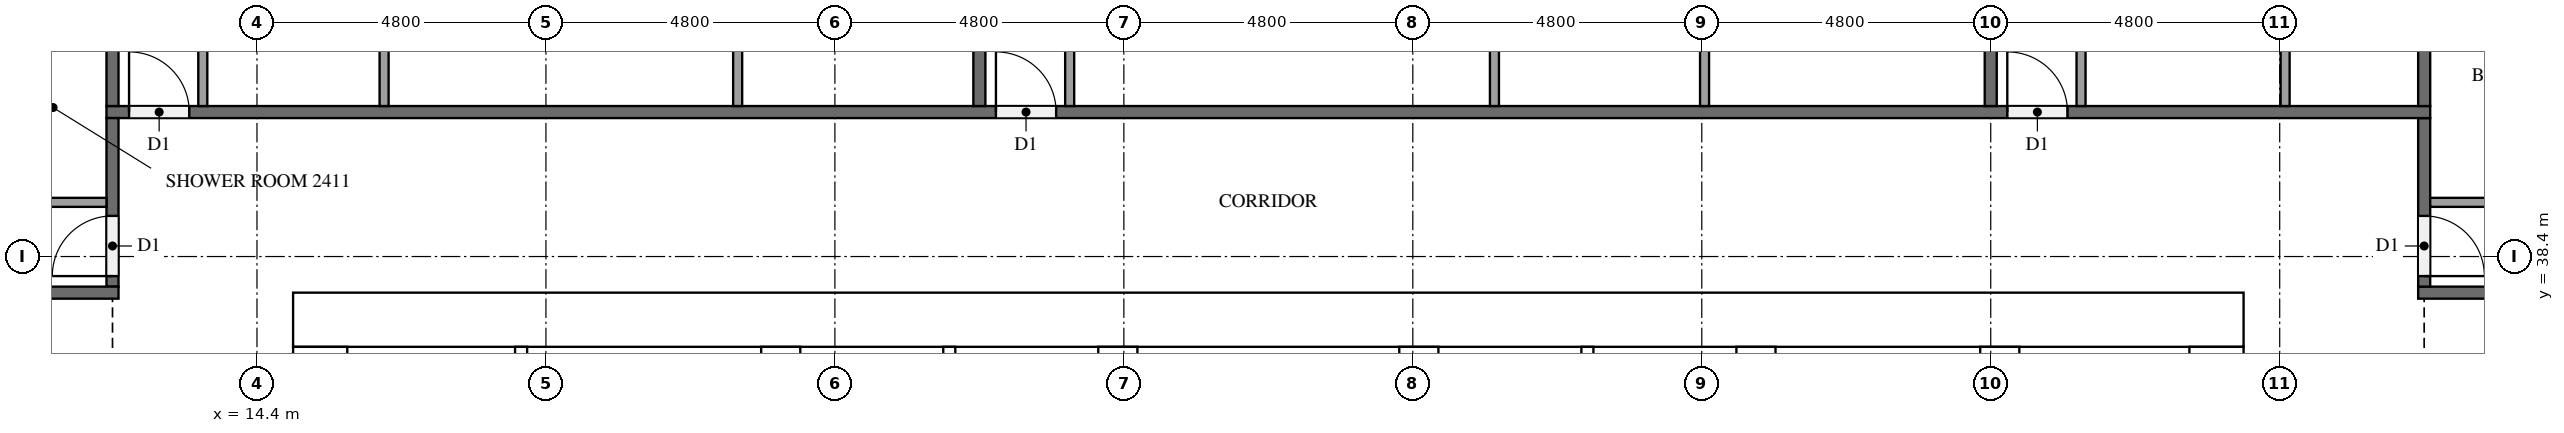
"""IFC4 building model, lengths in metres.
Left out: names, types, materials, properties, quantities, classifications, styles, units other than length and angle.
Written with IfcOpenShell. Run it as: python <this file> out.ifc"""

import sys

from ifc_helpers import new_model, si_unit, direction, frame, frame_2d, origin, place, context, subcontext, project, spatial, rectangle, extrude, element, fill, save


model = new_model("IFC4")
c1 = context("Model", 3, precision=1e-05, world=origin(), true_north=direction((0.0, 1.0)))
c2 = subcontext(c1, "Body", "Model", "MODEL_VIEW")
j1 = project(units=[si_unit("LENGTHUNIT", "METRE"), si_unit("PLANEANGLEUNIT", "RADIAN")], contexts=[c1])
p1 = place(None, origin())
s1 = spatial("IfcSite", under=j1, at=p1, CompositionType="ELEMENT")
p2 = place(p1, origin())
s2 = spatial("IfcBuilding", under=s1, at=p2, CompositionType="ELEMENT")
p3 = place(p2, frame((0.0, 0.0, 96.2)))
s3 = spatial("IfcBuildingStorey", under=s2, at=p3, CompositionType="ELEMENT", Elevation=96.2)
p4 = place(p3, frame((15.0, 37.35, 0.0), z_axis=(0.0, 0.0, 1.0), x_axis=(1.0, 0.0, 0.0)))
e1 = element("IfcWall", 1, at=p4, inside=s3, PredefinedType="SHEAR", context=c2, shape_type="SweptSolid", body=[
    extrude(rectangle(XDim=32.4, YDim=0.9, at=frame_2d((16.2, 0.0))), origin(), (0.0, 0.0, 1.0), 3.2),
])
p5 = place(p4, frame((15.3, 0.0, 0.0)))
e2 = element("IfcOpeningElement", 2, at=p5, cuts=e1, PredefinedType="OPENING", context=c2, shape_type="SweptSolid", body=[
    extrude(rectangle(XDim=1.8, YDim=2.1, at=frame_2d((0.9, 1.05))), frame((0.0, 0.46, 0.0), z_axis=(0.0, -1.0, 0.0), x_axis=(1.0, 0.0, 0.0)), (0.0, 0.0, 1.0), 0.92),
])
p6 = place(p4, frame((1.794, 0.0, 0.0)))
e3 = element("IfcOpeningElement", 3, at=p6, cuts=e1, PredefinedType="OPENING", context=c2, shape_type="SweptSolid", body=[
    extrude(rectangle(XDim=1.0, YDim=2.1, at=frame_2d((0.5, 1.05))), frame((0.0, 0.46, 0.0), z_axis=(0.0, -1.0, 0.0), x_axis=(1.0, 0.0, 0.0)), (0.0, 0.0, 1.0), 0.92),
])
p7 = place(p4, frame((5.331, 0.0, 0.0)))
e4 = element("IfcOpeningElement", 4, at=p7, cuts=e1, PredefinedType="OPENING", context=c2, shape_type="SweptSolid", body=[
    extrude(rectangle(XDim=1.0, YDim=2.1, at=frame_2d((0.5, 1.05))), frame((0.0, 0.46, 0.0), z_axis=(0.0, -1.0, 0.0), x_axis=(1.0, 0.0, 0.0)), (0.0, 0.0, 1.0), 0.92),
])
p8 = place(p3, frame((15.45, 15.9, 0.0), z_axis=(0.0, 0.0, 1.0), x_axis=(0.0, 1.0, 0.0)))
e5 = element("IfcWall", 5, at=p8, inside=s3, PredefinedType="SHEAR", context=c2, shape_type="SweptSolid", body=[
    extrude(rectangle(XDim=21.0, YDim=0.9, at=frame_2d((10.5, 0.0))), origin(), (0.0, 0.0, 1.0), 3.2),
])
p9 = place(p8, frame((4.86, 0.0, 0.0)))
e6 = element("IfcOpeningElement", 6, at=p9, cuts=e5, PredefinedType="OPENING", context=c2, shape_type="SweptSolid", body=[
    extrude(rectangle(XDim=1.2, YDim=2.1, at=frame_2d((0.6, 1.05))), frame((0.0, 0.46, 0.0), z_axis=(0.0, -1.0, 0.0), x_axis=(1.0, 0.0, 0.0)), (0.0, 0.0, 1.0), 0.92),
])
p10 = place(p3, frame((46.95, 15.9, 0.0), z_axis=(0.0, 0.0, 1.0), x_axis=(0.0, 1.0, 0.0)))
e7 = element("IfcWall", 7, at=p10, inside=s3, PredefinedType="SHEAR", context=c2, shape_type="SweptSolid", body=[
    extrude(rectangle(XDim=21.0, YDim=0.9, at=frame_2d((10.5, 0.0))), origin(), (0.0, 0.0, 1.0), 3.2),
])
p11 = place(p10, frame((10.2, 0.0, 0.0)))
e8 = element("IfcOpeningElement", 8, at=p11, cuts=e7, PredefinedType="OPENING", context=c2, shape_type="SweptSolid", body=[
    extrude(rectangle(XDim=1.2, YDim=2.1, at=frame_2d((0.6, 1.05))), frame((0.0, 0.46, 0.0), z_axis=(0.0, -1.0, 0.0), x_axis=(1.0, 0.0, 0.0)), (0.0, 0.0, 1.0), 0.92),
])
p12 = place(p3, frame((23.1, 15.9, 0.0), z_axis=(0.0, 0.0, 1.0), x_axis=(0.0, 1.0, 0.0)))
e9 = element("IfcWall", 9, at=p12, inside=s3, PredefinedType="SHEAR", context=c2, shape_type="SweptSolid", body=[
    extrude(rectangle(XDim=21.0, YDim=0.65, at=frame_2d((10.5, 0.0))), origin(), (0.0, 0.0, 1.0), 3.2),
])
p13 = place(p3, frame((39.3, 27.75, 0.0), z_axis=(0.0, 0.0, 1.0), x_axis=(0.0, 1.0, 0.0)))
e10 = element("IfcWall", 10, at=p13, inside=s3, PredefinedType="SHEAR", context=c2, shape_type="SweptSolid", body=[
    extrude(rectangle(XDim=9.15, YDim=0.65, at=frame_2d((4.575, 0.0))), origin(), (0.0, 0.0, 1.0), 3.2),
])
p14 = place(p3, frame((43.35, 27.75, 0.0), z_axis=(0.0, 0.0, 1.0), x_axis=(0.0, 1.0, 0.0)))
e11 = element("IfcWall", 11, at=p14, inside=s3, PredefinedType="SHEAR", context=c2, shape_type="SweptSolid", body=[
    extrude(rectangle(XDim=9.15, YDim=0.65, at=frame_2d((4.575, 0.0))), origin(), (0.0, 0.0, 1.0), 3.2),
])
p15 = place(p14, frame((7.65, 0.0, 0.0)))
e12 = element("IfcOpeningElement", 12, at=p15, cuts=e11, PredefinedType="OPENING", context=c2, shape_type="SweptSolid", body=[
    extrude(rectangle(XDim=1.2, YDim=2.1, at=frame_2d((0.6, 1.05))), frame((0.0, 0.335, 0.0), z_axis=(0.0, -1.0, 0.0), x_axis=(1.0, 0.0, 0.0)), (0.0, 0.0, 1.0), 0.67),
])
for number, where, z_axis, x_axis in (
    (13, (28.7, 33.875, 0.0), (0.0, 0.0, 1.0), (0.0, 1.0, 0.0)),
    (14, (33.7, 33.875, 0.0), (0.0, 0.0, 1.0), (0.0, 1.0, 0.0)),
):
    element("IfcWall", number, at=place(p3, frame(where, z_axis=z_axis, x_axis=x_axis)), inside=s3, PredefinedType="SHEAR", context=c2, shape_type="SweptSolid", body=[
        extrude(rectangle(XDim=3.025, YDim=0.65, at=frame_2d((1.512, 0.0))), origin(), (0.0, 0.0, 1.0), 3.2),
    ])
for number, where, z_axis, x_axis in (
    (15, (25.9, 33.875, 0.0), (0.0, 0.0, 1.0), (0.0, 1.0, 0.0)),
    (16, (36.5, 33.875, 0.0), (0.0, 0.0, 1.0), (0.0, 1.0, 0.0)),
):
    element("IfcWall", number, at=place(p3, frame(where, z_axis=z_axis, x_axis=x_axis)), inside=s3, PredefinedType="SOLIDWALL", context=c2, shape_type="SweptSolid", body=[
        extrude(rectangle(XDim=3.025, YDim=0.2, at=frame_2d((1.512, 0.0))), origin(), (0.0, 0.0, 1.0), 3.2),
    ])
p16 = place(p3, frame((18.788, 31.575, 0.0), z_axis=(0.0, 0.0, 1.0), x_axis=(0.0, 1.0, 0.0)))
e17 = element("IfcWall", 17, at=p16, inside=s3, PredefinedType="PARTITIONING", context=c2, shape_type="SweptSolid", body=[
    extrude(rectangle(XDim=5.325, YDim=0.2, at=frame_2d((2.663, 0.0))), origin(), (0.0, 0.0, 1.0), 3.2),
])
p17 = place(p3, frame((52.5, 37.8, 0.0), z_axis=(0.0, 0.0, 1.0), x_axis=(-1.0, 0.0, 0.0)))
e18 = element("IfcWall", 18, at=p17, inside=s3, PredefinedType="PARTITIONING", context=c2, shape_type="SweptSolid", body=[
    extrude(rectangle(XDim=2.2, YDim=0.2, at=frame_2d((1.1, 0.0))), origin(), (0.0, 0.0, 1.0), 3.2),
])
p18 = place(p3, frame((50.4, 40.7, 0.0), z_axis=(0.0, 0.0, 1.0), x_axis=(0.0, -1.0, 0.0)))
e19 = element("IfcWall", 19, at=p18, inside=s3, PredefinedType="PARTITIONING", context=c2, shape_type="SweptSolid", body=[
    extrude(rectangle(XDim=2.8, YDim=0.2, at=frame_2d((1.4, 0.0))), origin(), (0.0, 0.0, 1.0), 3.2),
])
p19 = place(p18, frame((1.625, 0.0, 0.0)))
e20 = element("IfcOpeningElement", 20, at=p19, cuts=e19, PredefinedType="OPENING", context=c2, shape_type="SweptSolid", body=[
    extrude(rectangle(XDim=1.0, YDim=2.1, at=frame_2d((0.5, 1.05))), frame((0.0, 0.11, 0.0), z_axis=(0.0, -1.0, 0.0), x_axis=(1.0, 0.0, 0.0)), (0.0, 0.0, 1.0), 0.22),
])
p20 = place(p3, frame((11.9, 40.8, 0.0), z_axis=(0.0, 0.0, 1.0), x_axis=(1.0, 0.0, 0.0)))
e21 = element("IfcWall", 21, at=p20, inside=s3, PredefinedType="PARTITIONING", context=c2, shape_type="SweptSolid", body=[
    extrude(rectangle(XDim=38.6, YDim=0.2, at=frame_2d((19.3, 0.0))), origin(), (0.0, 0.0, 1.0), 3.2),
])
p21 = place(p20, frame((31.575, 0.0, 0.0)))
e22 = element("IfcOpeningElement", 22, at=p21, cuts=e21, PredefinedType="OPENING", context=c2, shape_type="SweptSolid", body=[
    extrude(rectangle(XDim=1.0, YDim=2.1, at=frame_2d((0.5, 1.05))), frame((0.0, 0.11, 0.0), z_axis=(0.0, -1.0, 0.0), x_axis=(1.0, 0.0, 0.0)), (0.0, 0.0, 1.0), 0.22),
])
p22 = place(p20, frame((14.775, 0.0, 0.0)))
e23 = element("IfcOpeningElement", 23, at=p22, cuts=e21, PredefinedType="OPENING", context=c2, shape_type="SweptSolid", body=[
    extrude(rectangle(XDim=1.0, YDim=2.1, at=frame_2d((0.5, 1.05))), frame((0.0, 0.11, 0.0), z_axis=(0.0, -1.0, 0.0), x_axis=(1.0, 0.0, 0.0)), (0.0, 0.0, 1.0), 0.22),
])
p23 = place(p20, frame((0.375, 0.0, 0.0)))
e24 = element("IfcOpeningElement", 24, at=p23, cuts=e21, PredefinedType="OPENING", context=c2, shape_type="SweptSolid", body=[
    extrude(rectangle(XDim=1.0, YDim=2.1, at=frame_2d((0.5, 1.05))), frame((0.0, 0.11, 0.0), z_axis=(0.0, -1.0, 0.0), x_axis=(1.0, 0.0, 0.0)), (0.0, 0.0, 1.0), 0.22),
])
p24 = place(p3, frame((12.0, 37.9, 0.0), z_axis=(0.0, 0.0, 1.0), x_axis=(0.0, 1.0, 0.0)))
e25 = element("IfcWall", 25, at=p24, inside=s3, PredefinedType="PARTITIONING", context=c2, shape_type="SweptSolid", body=[
    extrude(rectangle(XDim=2.8, YDim=0.2, at=frame_2d((1.4, 0.0))), origin(), (0.0, 0.0, 1.0), 3.2),
])
p25 = place(p24, frame((0.175, 0.0, 0.0)))
e26 = element("IfcOpeningElement", 26, at=p25, cuts=e25, PredefinedType="OPENING", context=c2, shape_type="SweptSolid", body=[
    extrude(rectangle(XDim=1.0, YDim=2.1, at=frame_2d((0.5, 1.05))), frame((0.0, 0.11, 0.0), z_axis=(0.0, -1.0, 0.0), x_axis=(1.0, 0.0, 0.0)), (0.0, 0.0, 1.0), 0.22),
])
p26 = place(p3, frame((12.1, 37.8, 0.0), z_axis=(0.0, 0.0, 1.0), x_axis=(-1.0, 0.0, 0.0)))
e27 = element("IfcWall", 27, at=p26, inside=s3, PredefinedType="PARTITIONING", context=c2, shape_type="SweptSolid", body=[
    extrude(rectangle(XDim=2.2, YDim=0.2, at=frame_2d((1.1, 0.0))), origin(), (0.0, 0.0, 1.0), 3.2),
])
for number, where, z_axis, x_axis in (
    (28, (50.4, 40.9, 0.0), (0.0, 0.0, 1.0), (0.0, 1.0, 0.0)),
    (29, (43.2, 52.7, 0.0), (0.0, 0.0, 1.0), (0.0, -1.0, 0.0)),
    (30, (26.4, 52.7, 0.0), (0.0, 0.0, 1.0), (0.0, -1.0, 0.0)),
    (31, (12.0, 52.7, 0.0), (0.0, 0.0, 1.0), (0.0, -1.0, 0.0)),
):
    element("IfcWall", number, at=place(p3, frame(where, z_axis=z_axis, x_axis=x_axis)), inside=s3, PredefinedType="PARTITIONING", context=c2, shape_type="SweptSolid", body=[
        extrude(rectangle(XDim=11.8, YDim=0.2, at=frame_2d((5.9, 0.0))), origin(), (0.0, 0.0, 1.0), 3.2),
    ])
p27 = place(p3, frame((50.5, 39.3, 0.0), z_axis=(0.0, 0.0, 1.0), x_axis=(1.0, 0.0, 0.0)))
e32 = element("IfcWall", 32, at=p27, inside=s3, PredefinedType="PARTITIONING", context=c2, shape_type="SweptSolid", body=[
    extrude(rectangle(XDim=4.025, YDim=0.15, at=frame_2d((2.012, 0.0))), origin(), (0.0, 0.0, 1.0), 3.2),
])
p28 = place(p3, frame((48.09, 40.9, 0.0), z_axis=(0.0, 0.0, 1.0), x_axis=(0.0, 1.0, 0.0)))
e33 = element("IfcWall", 33, at=p28, inside=s3, PredefinedType="PARTITIONING", context=c2, shape_type="SweptSolid", body=[
    extrude(rectangle(XDim=4.175, YDim=0.15, at=frame_2d((2.087, 0.0))), origin(), (0.0, 0.0, 1.0), 3.2),
])
p29 = place(p3, frame((44.7, 40.9, 0.0), z_axis=(0.0, 0.0, 1.0), x_axis=(0.0, 1.0, 0.0)))
e34 = element("IfcWall", 34, at=p29, inside=s3, PredefinedType="PARTITIONING", context=c2, shape_type="SweptSolid", body=[
    extrude(rectangle(XDim=4.325, YDim=0.15, at=frame_2d((2.163, 0.0))), origin(), (0.0, 0.0, 1.0), 3.2),
])
for number, where, z_axis, x_axis in (
    (35, (34.956, 40.9, 0.0), (0.0, 0.0, 1.0), (0.0, 1.0, 0.0)),
    (36, (38.446, 40.9, 0.0), (0.0, 0.0, 1.0), (0.0, 1.0, 0.0)),
):
    element("IfcWall", number, at=place(p3, frame(where, z_axis=z_axis, x_axis=x_axis)), inside=s3, PredefinedType="PARTITIONING", context=c2, shape_type="SweptSolid", body=[
        extrude(rectangle(XDim=4.475, YDim=0.15, at=frame_2d((2.238, 0.0))), origin(), (0.0, 0.0, 1.0), 3.2),
    ])
p30 = place(p3, frame((27.9, 40.9, 0.0), z_axis=(0.0, 0.0, 1.0), x_axis=(0.0, 1.0, 0.0)))
e37 = element("IfcWall", 37, at=p30, inside=s3, PredefinedType="PARTITIONING", context=c2, shape_type="SweptSolid", body=[
    extrude(rectangle(XDim=4.625, YDim=0.15, at=frame_2d((2.312, 0.0))), origin(), (0.0, 0.0, 1.0), 3.2),
])
for number, where, z_axis, x_axis in (
    (38, (16.511, 40.9, 0.0), (0.0, 0.0, 1.0), (0.0, 1.0, 0.0)),
    (39, (22.385, 40.9, 0.0), (0.0, 0.0, 1.0), (0.0, 1.0, 0.0)),
):
    element("IfcWall", number, at=place(p3, frame(where, z_axis=z_axis, x_axis=x_axis)), inside=s3, PredefinedType="PARTITIONING", context=c2, shape_type="SweptSolid", body=[
        extrude(rectangle(XDim=2.975, YDim=0.15, at=frame_2d((1.488, 0.0))), origin(), (0.0, 0.0, 1.0), 3.2),
    ])
p31 = place(p3, frame((13.5, 40.9, 0.0), z_axis=(0.0, 0.0, 1.0), x_axis=(0.0, 1.0, 0.0)))
e40 = element("IfcWall", 40, at=p31, inside=s3, PredefinedType="PARTITIONING", context=c2, shape_type="SweptSolid", body=[
    extrude(rectangle(XDim=3.125, YDim=0.15, at=frame_2d((1.562, 0.0))), origin(), (0.0, 0.0, 1.0), 3.2),
])
p32 = place(p3, frame((11.9, 39.3, 0.0), z_axis=(0.0, 0.0, 1.0), x_axis=(-1.0, 0.0, 0.0)))
e41 = element("IfcWall", 41, at=p32, inside=s3, PredefinedType="PARTITIONING", context=c2, shape_type="SweptSolid", body=[
    extrude(rectangle(XDim=1.925, YDim=0.15, at=frame_2d((0.962, 0.0))), origin(), (0.0, 0.0, 1.0), 3.2),
])
p33 = place(p5, origin())
e42 = element("IfcDoor", 42, at=p33, inside=s3, OperationType="DOUBLE_DOOR_SINGLE_SWING", PredefinedType="DOOR", context=c2, shape_type="SweptSolid", body=[
    extrude(rectangle(XDim=1.8, YDim=2.1, at=frame_2d((0.9, 1.05))), frame((0.0, 0.025, 0.0), z_axis=(0.0, -1.0, 0.0), x_axis=(1.0, 0.0, 0.0)), (0.0, 0.0, 1.0), 0.05),
])
fill(e2, e42)
p34 = place(p6, origin())
e43 = element("IfcDoor", 43, at=p34, inside=s3, OperationType="SINGLE_SWING_LEFT", PredefinedType="DOOR", context=c2, shape_type="SweptSolid", body=[
    extrude(rectangle(XDim=1.0, YDim=2.1, at=frame_2d((0.5, 1.05))), frame((0.0, 0.025, 0.0), z_axis=(0.0, -1.0, 0.0), x_axis=(1.0, 0.0, 0.0)), (0.0, 0.0, 1.0), 0.05),
])
fill(e3, e43)
p35 = place(p7, origin())
e44 = element("IfcDoor", 44, at=p35, inside=s3, OperationType="SINGLE_SWING_RIGHT", PredefinedType="DOOR", context=c2, shape_type="SweptSolid", body=[
    extrude(rectangle(XDim=1.0, YDim=2.1, at=frame_2d((0.5, 1.05))), frame((0.0, 0.025, 0.0), z_axis=(0.0, -1.0, 0.0), x_axis=(1.0, 0.0, 0.0)), (0.0, 0.0, 1.0), 0.05),
])
fill(e4, e44)
p36 = place(p19, origin())
e45 = element("IfcDoor", 45, at=p36, inside=s3, OperationType="SINGLE_SWING_RIGHT", PredefinedType="DOOR", context=c2, shape_type="SweptSolid", body=[
    extrude(rectangle(XDim=1.0, YDim=2.1, at=frame_2d((0.5, 1.05))), frame((0.0, 0.025, 0.0), z_axis=(0.0, -1.0, 0.0), x_axis=(1.0, 0.0, 0.0)), (0.0, 0.0, 1.0), 0.05),
])
fill(e20, e45)
p37 = place(p21, origin())
e46 = element("IfcDoor", 46, at=p37, inside=s3, OperationType="SINGLE_SWING_LEFT", PredefinedType="DOOR", context=c2, shape_type="SweptSolid", body=[
    extrude(rectangle(XDim=1.0, YDim=2.1, at=frame_2d((0.5, 1.05))), frame((0.0, 0.025, 0.0), z_axis=(0.0, -1.0, 0.0), x_axis=(1.0, 0.0, 0.0)), (0.0, 0.0, 1.0), 0.05),
])
fill(e22, e46)
p38 = place(p22, origin())
e47 = element("IfcDoor", 47, at=p38, inside=s3, OperationType="SINGLE_SWING_LEFT", PredefinedType="DOOR", context=c2, shape_type="SweptSolid", body=[
    extrude(rectangle(XDim=1.0, YDim=2.1, at=frame_2d((0.5, 1.05))), frame((0.0, 0.025, 0.0), z_axis=(0.0, -1.0, 0.0), x_axis=(1.0, 0.0, 0.0)), (0.0, 0.0, 1.0), 0.05),
])
fill(e23, e47)
p39 = place(p23, origin())
e48 = element("IfcDoor", 48, at=p39, inside=s3, OperationType="SINGLE_SWING_LEFT", PredefinedType="DOOR", context=c2, shape_type="SweptSolid", body=[
    extrude(rectangle(XDim=1.0, YDim=2.1, at=frame_2d((0.5, 1.05))), frame((0.0, 0.025, 0.0), z_axis=(0.0, -1.0, 0.0), x_axis=(1.0, 0.0, 0.0)), (0.0, 0.0, 1.0), 0.05),
])
fill(e24, e48)
p40 = place(p25, origin())
e49 = element("IfcDoor", 49, at=p40, inside=s3, OperationType="SINGLE_SWING_LEFT", PredefinedType="DOOR", context=c2, shape_type="SweptSolid", body=[
    extrude(rectangle(XDim=1.0, YDim=2.1, at=frame_2d((0.5, 1.05))), frame((0.0, 0.025, 0.0), z_axis=(0.0, -1.0, 0.0), x_axis=(1.0, 0.0, 0.0)), (0.0, 0.0, 1.0), 0.05),
])
fill(e26, e49)
save(model, sys.argv[1])
